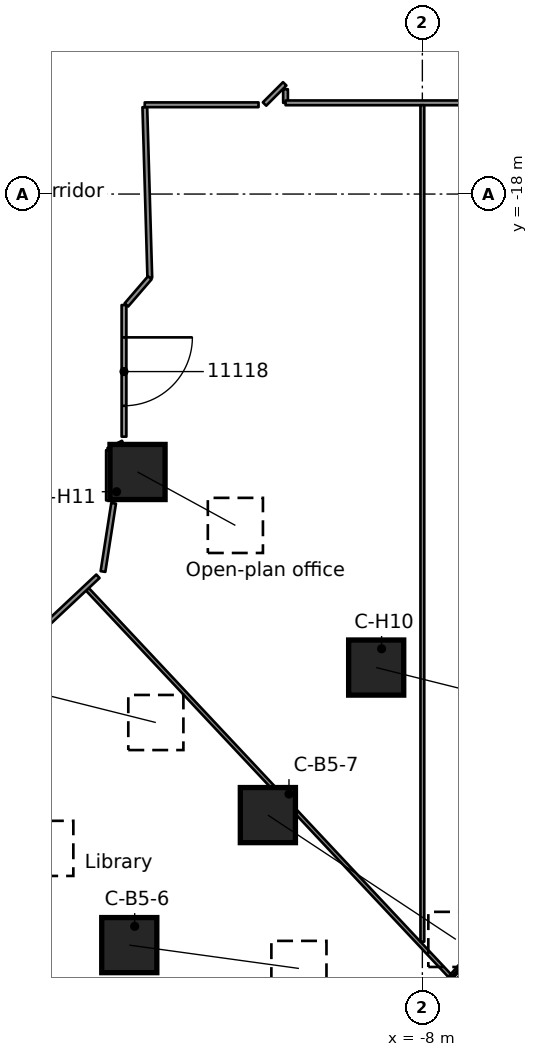
"""IFC4 building model, lengths in metres.
Left out: names, types, materials, properties, quantities, classifications, styles, units other than length and angle.
Written with IfcOpenShell. Run it as: python <this file> out.ifc"""

import sys

from ifc_helpers import new_model, si_unit, direction, frame, frame_2d, origin, origin_2d, place, context, subcontext, project, spatial, rectangle, extrude, element, fill, save


model = new_model("IFC4")
c1 = context("Model", 3, precision=1e-05, world=origin(), true_north=direction((0.0, 1.0)))
c2 = subcontext(c1, "Body", "Model", "MODEL_VIEW")
j1 = project(units=[si_unit("LENGTHUNIT", "METRE"), si_unit("PLANEANGLEUNIT", "RADIAN")], contexts=[c1])
p1 = place(None, origin())
s1 = spatial("IfcSite", under=j1, at=p1, CompositionType="ELEMENT")
p2 = place(p1, origin())
s2 = spatial("IfcBuilding", under=s1, at=p2, CompositionType="ELEMENT")
p3 = place(p2, frame((0.0, 0.0, 54.8)))
s3 = spatial("IfcBuildingStorey", under=s2, at=p3, CompositionType="ELEMENT", Elevation=54.8)
p4 = place(p3, frame((-22.028, -33.961, 0.609), z_axis=(0.803445484043, -0.245005157385, 0.542630470049), x_axis=(0.291682692006, 0.956515136934, 0.0)))
e1 = element("IfcColumn", 1, at=p4, inside=s3, PredefinedType="COLUMN", context=c2, shape_type="SweptSolid", body=[
    extrude(rectangle(XDim=1.45, YDim=1.45, at=origin_2d()), origin(), (0.0, 0.0, 1.0), 5.127),
])
p5 = place(p3, frame((-18.819, -30.951, 0.588), z_axis=(0.787390274069, -0.197377882685, 0.584002164147), x_axis=(0.243150442879, 0.969988588659, 0.0)))
e2 = element("IfcColumn", 2, at=p5, inside=s3, PredefinedType="COLUMN", context=c2, shape_type="SweptSolid", body=[
    extrude(rectangle(XDim=1.45, YDim=1.45, at=origin_2d()), origin(), (0.0, 0.0, 1.0), 4.834),
])
p6 = place(p3, frame((-15.712, -37.762, 0.618), z_axis=(0.844461322834, -0.116157308408, 0.522869538165), x_axis=(0.136268858518, 0.990671892303, 0.0)))
e3 = element("IfcColumn", 3, at=p6, inside=s3, PredefinedType="COLUMN", context=c2, shape_type="SweptSolid", body=[
    extrude(rectangle(XDim=1.45, YDim=1.45, at=origin_2d()), origin(), (0.0, 0.0, 1.0), 5.286),
])
p7 = place(p3, frame((-12.065, -34.341, 0.661), z_axis=(0.7601997226, -0.502647973321, 0.41163259914), x_axis=(0.551542261088, 0.834146950024, 0.0)))
e4 = element("IfcColumn", 4, at=p7, inside=s3, PredefinedType="COLUMN", context=c2, shape_type="SweptSolid", body=[
    extrude(rectangle(XDim=1.45, YDim=1.45, at=origin_2d()), origin(), (0.0, 0.0, 1.0), 6.508),
])
p8 = place(p3, frame((-9.215, -30.459, 0.53), z_axis=(0.708756376313, -0.176721352289, 0.682959707948), x_axis=(0.241932903281, 0.970292981686, 0.0)))
e5 = element("IfcColumn", 5, at=p8, inside=s3, PredefinedType="COLUMN", context=c2, shape_type="SweptSolid", body=[
    extrude(rectangle(XDim=1.45, YDim=1.45, at=origin_2d()), origin(), (0.0, 0.0, 1.0), 4.306),
])
p9 = place(p3, frame((-15.495, -25.313, 0.508), z_axis=(0.61545416164, -0.336025835882, 0.71295358372), x_axis=(0.479207722379, 0.877701520343, 0.0)))
e6 = element("IfcColumn", 6, at=p9, inside=s3, PredefinedType="COLUMN", context=c2, shape_type="SweptSolid", body=[
    extrude(rectangle(XDim=1.45, YDim=1.45, at=origin_2d()), origin(), (0.0, 0.0, 1.0), 4.184),
])
p10 = place(p3, frame((-11.601, -15.242, 0.0), z_axis=(0.0, 0.0, 1.0), x_axis=(0.002726642898, -0.999996282702, 0.0)))
e7 = element("IfcWall", 7, at=p10, inside=s3, PredefinedType="PARTITIONING", context=c2, shape_type="SweptSolid", body=[
    extrude(rectangle(XDim=0.358, YDim=0.125, at=frame_2d((0.179, 0.0))), origin(), (0.0, 0.0, 1.0), 3.58),
])
p11 = place(p3, frame((-15.303, -15.713, 0.0), z_axis=(0.0, 0.0, 1.0), x_axis=(0.029132320279, -0.999575563885, 0.0)))
e8 = element("IfcWall", 8, at=p11, inside=s3, PredefinedType="PARTITIONING", context=c2, shape_type="SweptSolid", body=[
    extrude(rectangle(XDim=4.492, YDim=0.125, at=frame_2d((2.246, 0.0))), origin(), (0.0, 0.0, 1.0), 3.58),
])
p12 = place(p3, frame((-24.638, -35.126, 0.0), z_axis=(0.0, 0.0, 1.0), x_axis=(0.684140619999, -0.729350129956, 0.0)))
e9 = element("IfcWall", 9, at=p12, inside=s3, PredefinedType="PARTITIONING", context=c2, shape_type="SweptSolid", body=[
    extrude(rectangle(XDim=15.752, YDim=0.1, at=frame_2d((7.876, 0.0))), origin(), (0.0, 0.0, 1.0), 3.58),
])
p13 = place(p3, frame((-16.813, -28.402, 0.0), z_axis=(0.0, 0.0, 1.0), x_axis=(0.684091249036, -0.729396437469, 0.0)))
e10 = element("IfcWall", 10, at=p13, inside=s3, PredefinedType="PARTITIONING", context=c2, shape_type="SweptSolid", body=[
    extrude(rectangle(XDim=14.28, YDim=0.1, at=frame_2d((7.14, 0.0))), origin(), (0.0, 0.0, 1.0), 3.58),
])
p14 = place(p3, frame((-16.259, -24.739, 0.0), z_axis=(0.0, 0.0, 1.0), x_axis=(0.894541480177, 0.446984944089, 0.0)))
e11 = element("IfcWall", 11, at=p14, inside=s3, PredefinedType="PARTITIONING", context=c2, shape_type="SweptSolid", body=[
    extrude(rectangle(XDim=0.427, YDim=0.125, at=frame_2d((0.213, 0.0))), origin(), (0.0, 0.0, 1.0), 3.58),
])
p15 = place(p3, frame((-15.305, -15.651, 0.0), z_axis=(0.0, 0.0, 1.0), x_axis=(1.0, 0.0, 0.0)))
e12 = element("IfcWall", 12, at=p15, inside=s3, PredefinedType="PARTITIONING", context=c2, shape_type="SweptSolid", body=[
    extrude(rectangle(XDim=2.994, YDim=0.125, at=frame_2d((1.497, 0.0))), origin(), (0.0, 0.0, 1.0), 3.58),
])
p16 = place(p3, frame((11.539, -15.6, 0.0), z_axis=(0.0, 0.0, 1.0), x_axis=(-1.0, 0.0, 0.0)))
e13 = element("IfcWall", 13, at=p16, inside=s3, PredefinedType="PARTITIONING", context=c2, shape_type="SweptSolid", body=[
    extrude(rectangle(XDim=23.139, YDim=0.125, at=frame_2d((11.57, 0.0))), origin(), (0.0, 0.0, 1.0), 3.58),
])
p17 = place(p16, frame((14.638, 0.0, 0.0)))
e14 = element("IfcOpeningElement", 14, at=p17, cuts=e13, PredefinedType="OPENING", context=c2, shape_type="SweptSolid", body=[
    extrude(rectangle(XDim=1.8, YDim=2.1, at=frame_2d((0.9, 1.05))), frame((0.0, 0.073, 0.0), z_axis=(0.0, -1.0, 0.0), x_axis=(1.0, 0.0, 0.0)), (0.0, 0.0, 1.0), 0.145),
])
p18 = place(p16, frame((6.888, 0.0, 0.0)))
e15 = element("IfcOpeningElement", 15, at=p18, cuts=e13, PredefinedType="OPENING", context=c2, shape_type="SweptSolid", body=[
    extrude(rectangle(XDim=1.1, YDim=2.1, at=frame_2d((0.55, 1.05))), frame((0.0, 0.073, 0.0), z_axis=(0.0, -1.0, 0.0), x_axis=(1.0, 0.0, 0.0)), (0.0, 0.0, 1.0), 0.145),
])
p19 = place(p3, frame((-15.789, -20.919, 0.0), z_axis=(0.0, 0.0, 1.0), x_axis=(0.652724991611, 0.757594934861, 0.0)))
e16 = element("IfcWall", 16, at=p19, inside=s3, PredefinedType="PARTITIONING", context=c2, shape_type="SweptSolid", body=[
    extrude(rectangle(XDim=0.945, YDim=0.125, at=frame_2d((0.473, 0.0))), origin(), (0.0, 0.0, 1.0), 3.58),
])
p20 = place(p3, frame((-18.807, -30.186, 0.0), z_axis=(0.0, 0.0, 1.0), x_axis=(0.729339012688, 0.684152471728, 0.0)))
e17 = element("IfcWall", 17, at=p20, inside=s3, PredefinedType="PARTITIONING", context=c2, shape_type="SweptSolid", body=[
    extrude(rectangle(XDim=3.112, YDim=0.125, at=frame_2d((1.556, 0.0))), origin(), (0.0, 0.0, 1.0), 3.58),
])
p21 = place(p3, frame((-12.153, -15.631, 0.0), z_axis=(0.0, 0.0, 1.0), x_axis=(0.707106781187, 0.707106781187, 0.0)))
e18 = element("IfcWall", 18, at=p21, inside=s3, PredefinedType="PARTITIONING", context=c2, shape_type="SweptSolid", body=[
    extrude(rectangle(XDim=0.751, YDim=0.125, at=frame_2d((0.375, 0.0))), origin(), (0.0, 0.0, 1.0), 3.58),
])
p22 = place(p3, frame((-16.404, -27.932, 0.0), z_axis=(0.0, 0.0, 1.0), x_axis=(0.154065464464, 0.988060642197, 0.0)))
e19 = element("IfcWall", 19, at=p22, inside=s3, PredefinedType="PARTITIONING", context=c2, shape_type="SweptSolid", body=[
    extrude(rectangle(XDim=1.818, YDim=0.125, at=frame_2d((0.909, 0.0))), origin(), (0.0, 0.0, 1.0), 3.58),
])
p23 = place(p3, frame((-8.0, -37.672, 0.0), z_axis=(0.0, 0.0, 1.0), x_axis=(0.0, 1.0, 0.0)))
e20 = element("IfcWall", 20, at=p23, inside=s3, PredefinedType="PARTITIONING", context=c2, shape_type="SweptSolid", body=[
    extrude(rectangle(XDim=22.01, YDim=0.1, at=frame_2d((11.005, 0.0))), origin(), (0.0, 0.0, 1.0), 3.58),
])
p24 = place(p3, frame((-15.851, -20.921, 0.0), z_axis=(0.0, 0.0, 1.0), x_axis=(0.0, -1.0, 0.0)))
e21 = element("IfcWall", 21, at=p24, inside=s3, PredefinedType="PARTITIONING", context=c2, shape_type="SweptSolid", body=[
    extrude(rectangle(XDim=3.462, YDim=0.125, at=frame_2d((1.731, 0.0))), origin(), (0.0, 0.0, 1.0), 3.58),
])
p25 = place(p24, frame((0.85, 0.0, 0.0)))
e22 = element("IfcOpeningElement", 22, at=p25, cuts=e21, PredefinedType="OPENING", context=c2, shape_type="SweptSolid", body=[
    extrude(rectangle(XDim=1.8, YDim=2.1, at=frame_2d((0.9, 1.05))), frame((0.0, 0.073, 0.0), z_axis=(0.0, -1.0, 0.0), x_axis=(1.0, 0.0, 0.0)), (0.0, 0.0, 1.0), 0.145),
])
p26 = place(p3, frame((-16.259, -26.061, 0.0), z_axis=(0.0, 0.0, 1.0), x_axis=(0.0, 1.0, 0.0)))
e23 = element("IfcWall", 23, at=p26, inside=s3, PredefinedType="PARTITIONING", context=c2, shape_type="SweptSolid", body=[
    extrude(rectangle(XDim=1.322, YDim=0.125, at=frame_2d((0.661, 0.0))), origin(), (0.0, 0.0, 1.0), 3.58),
])
p27 = place(p25, origin())
e24 = element("IfcDoor", 24, at=p27, inside=s3, OperationType="DOUBLE_DOOR_SINGLE_SWING", PredefinedType="DOOR", context=c2, shape_type="SweptSolid", body=[
    extrude(rectangle(XDim=1.8, YDim=2.1, at=frame_2d((0.9, 1.05))), frame((0.0, 0.025, 0.0), z_axis=(0.0, -1.0, 0.0), x_axis=(1.0, 0.0, 0.0)), (0.0, 0.0, 1.0), 0.05),
])
fill(e22, e24)
save(model, sys.argv[1])
